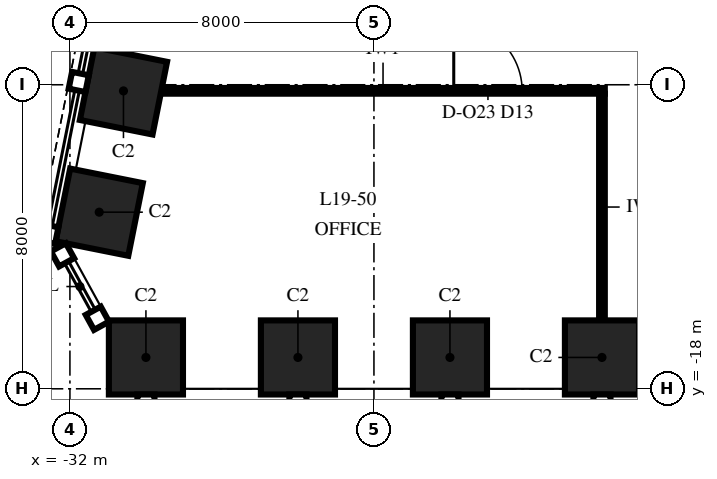
"""IFC4 building model, lengths in metres.
Left out: names, types, materials, properties, quantities, classifications, styles, units other than length and angle.
Written with IfcOpenShell. Run it as: python <this file> out.ifc"""

import sys

from ifc_helpers import new_model, si_unit, direction, frame, frame_2d, origin, origin_2d, place, context, subcontext, project, spatial, rectangle, extrude, element, fill, save


model = new_model("IFC4")
c1 = context("Model", 3, precision=1e-05, world=origin(), true_north=direction((0.0, 1.0)))
c2 = subcontext(c1, "Body", "Model", "MODEL_VIEW")
j1 = project(units=[si_unit("LENGTHUNIT", "METRE"), si_unit("PLANEANGLEUNIT", "RADIAN")], contexts=[c1])
p1 = place(None, origin())
s1 = spatial("IfcSite", under=j1, at=p1, CompositionType="ELEMENT")
p2 = place(p1, origin())
s2 = spatial("IfcBuilding", under=s1, at=p2, CompositionType="ELEMENT")
p3 = place(p2, frame((0.0, 0.0, 88.0)))
s3 = spatial("IfcBuildingStorey", under=s2, at=p3, CompositionType="ELEMENT", Elevation=88.0)
for number, where, z_axis, x_axis in (
    (1, (-30.0, -17.175, 0.0), (0.0, 0.0, 1.0), (1.0, 0.0, 0.0)),
    (2, (-26.0, -17.175, 0.0), (0.0, 0.0, 1.0), (1.0, 0.0, 0.0)),
    (3, (-22.0, -17.175, 0.0), (0.0, 0.0, 1.0), (1.0, 0.0, 0.0)),
    (4, (-18.0, -17.175, 0.0), (0.0, 0.0, 1.0), (1.0, 0.0, 0.0)),
    (5, (-30.591, -10.162, 0.0), (0.0, 0.0, 1.0), (-0.196, -0.981, 0.0)),
    (6, (-31.229, -13.353, 0.0), (0.0, 0.0, 1.0), (-0.196, -0.981, 0.0)),
):
    element("IfcColumn", number, at=place(p3, frame(where, z_axis=z_axis, x_axis=x_axis)), inside=s3, PredefinedType="COLUMN", context=c2, shape_type="SweptSolid", body=[
        extrude(rectangle(XDim=1.95, YDim=1.95, at=origin_2d()), origin(), (0.0, 0.0, 1.0), 4.0),
    ])
p4 = place(p3, frame((-29.596, -10.16, 0.0), z_axis=(0.0, 0.0, 1.0), x_axis=(1.0, 0.0, 0.0)))
e7 = element("IfcWall", 7, at=p4, inside=s3, PredefinedType="PARTITIONING", context=c2, shape_type="SweptSolid", body=[
    extrude(rectangle(XDim=11.671, YDim=0.15, at=frame_2d((5.836, 0.0))), origin(), (0.0, 0.0, 1.0), 3.13),
])
p5 = place(p4, frame((7.696, 0.0, 0.0)))
e8 = element("IfcOpeningElement", 8, at=p5, cuts=e7, PredefinedType="OPENING", context=c2, shape_type="SweptSolid", body=[
    extrude(rectangle(XDim=1.8, YDim=2.4, at=frame_2d((0.9, 1.2))), frame((0.0, 0.09, 0.0), z_axis=(0.0, -1.0, 0.0), x_axis=(1.0, 0.0, 0.0)), (0.0, 0.0, 1.0), 0.18),
])
p6 = place(p3, frame((-18.0, -16.2, 0.0), z_axis=(0.0, 0.0, 1.0), x_axis=(0.0, 1.0, 0.0)))
e9 = element("IfcWall", 9, at=p6, inside=s3, PredefinedType="PARTITIONING", context=c2, shape_type="SweptSolid", body=[
    extrude(rectangle(XDim=5.965, YDim=0.15, at=frame_2d((2.982, 0.0))), origin(), (0.0, 0.0, 1.0), 3.13),
])
p7 = place(p5, origin())
e10 = element("IfcDoor", 10, at=p7, inside=s3, OperationType="DOUBLE_DOOR_SINGLE_SWING", PredefinedType="DOOR", context=c2, shape_type="SweptSolid", body=[
    extrude(rectangle(XDim=1.8, YDim=2.4, at=frame_2d((0.9, 1.2))), frame((0.0, 0.075, 0.0), z_axis=(0.0, -1.0, 0.0), x_axis=(1.0, 0.0, 0.0)), (0.0, 0.0, 1.0), 0.149),
])
fill(e8, e10)
save(model, sys.argv[1])
